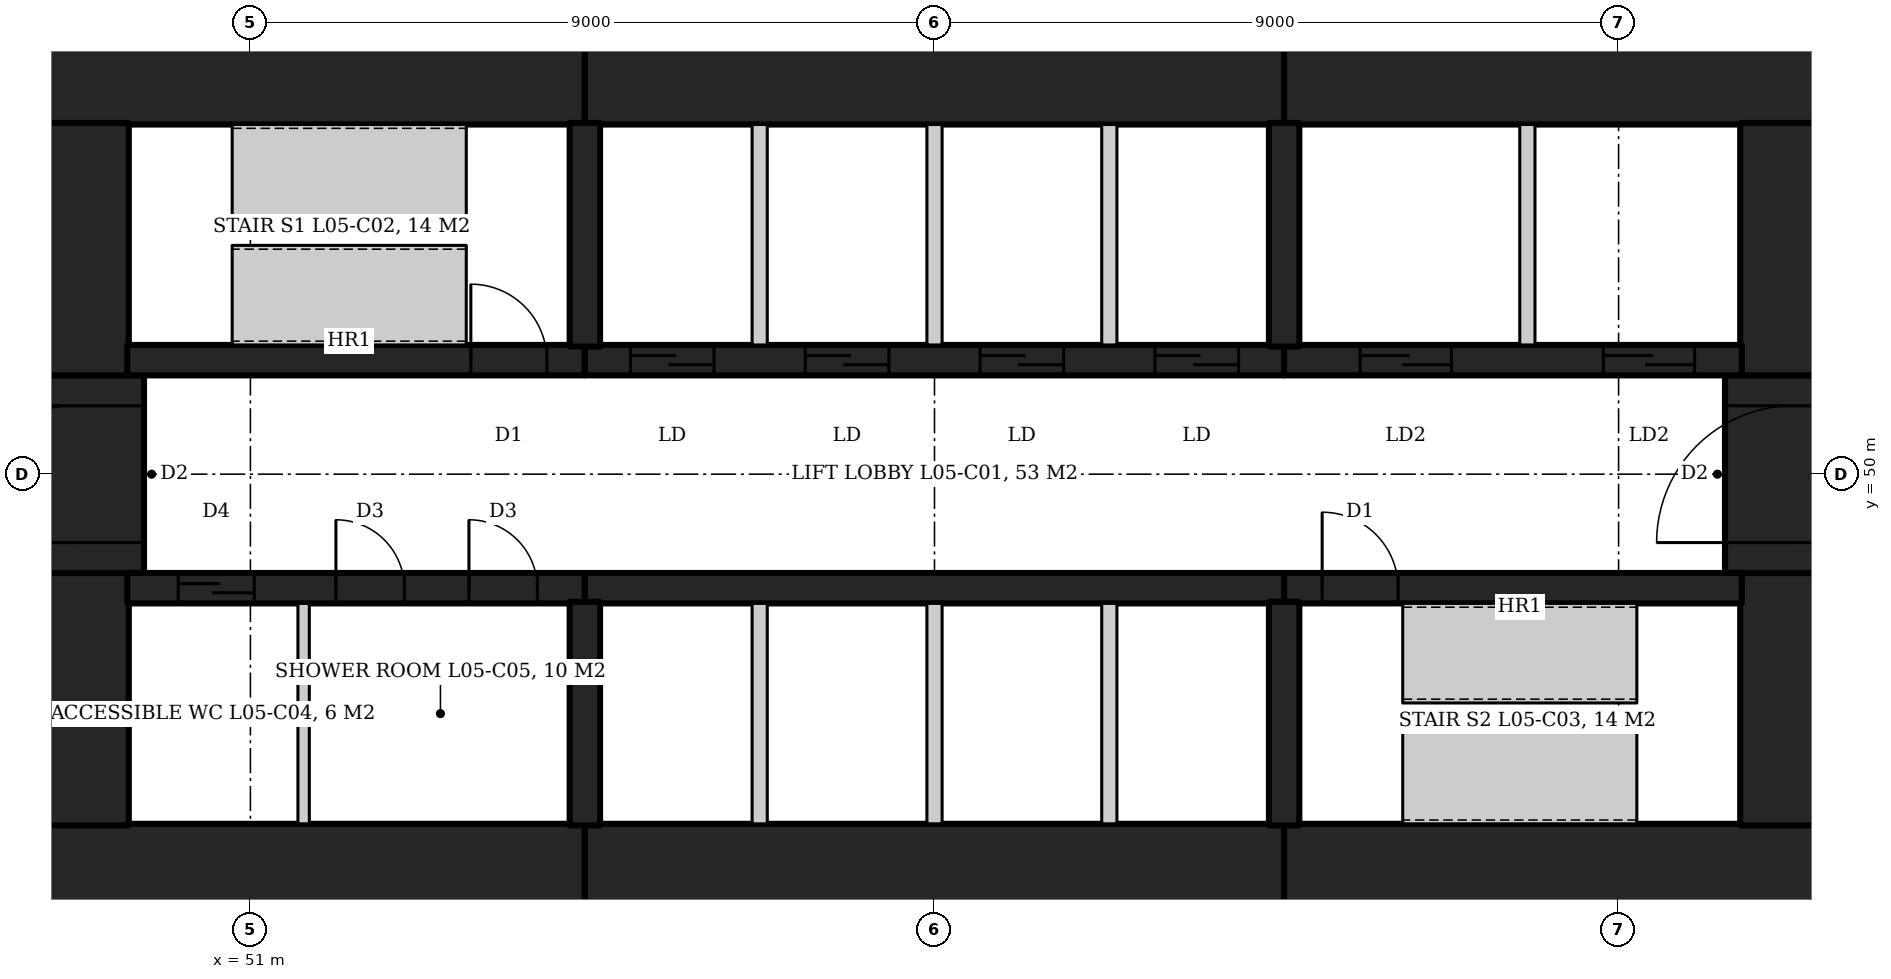
"""IFC4 building model, lengths in metres.
Left out: names, types, materials, properties, quantities, classifications, styles, units other than length and angle.
Written with IfcOpenShell. Run it as: python <this file> out.ifc"""

import sys

from ifc_helpers import new_model, si_unit, direction, frame, frame_2d, origin, place, context, subcontext, project, spatial, rectangle, extrude, element, fill, save


model = new_model("IFC4")
c1 = context("Model", 3, precision=1e-05, world=origin(), true_north=direction((0.0, 1.0)))
c2 = subcontext(c1, "Body", "Model", "MODEL_VIEW")
j1 = project(units=[si_unit("LENGTHUNIT", "METRE"), si_unit("PLANEANGLEUNIT", "RADIAN")], contexts=[c1])
p1 = place(None, origin())
s1 = spatial("IfcSite", under=j1, at=p1, CompositionType="ELEMENT")
p2 = place(p1, origin())
s2 = spatial("IfcBuilding", under=s1, at=p2, CompositionType="ELEMENT")
p3 = place(p2, frame((0.0, 0.0, 30.2)))
s3 = spatial("IfcBuildingStorey", under=s2, at=p3, CompositionType="ELEMENT", Elevation=30.2)
p4 = place(p3, frame((47.6, 55.5, 0.0), z_axis=(0.0, 0.0, 1.0), x_axis=(1.0, 0.0, 0.0)))
e1 = element("IfcWall", 1, at=p4, inside=s3, PredefinedType="SHEAR", context=c2, shape_type="SweptSolid", body=[
    extrude(rectangle(XDim=7.8, YDim=1.8, at=frame_2d((3.9, 0.0))), origin(), (0.0, 0.0, 1.0), 4.2),
])
p5 = place(p3, frame((55.4, 55.5, 0.0), z_axis=(0.0, 0.0, 1.0), x_axis=(1.0, 0.0, 0.0)))
e2 = element("IfcWall", 2, at=p5, inside=s3, PredefinedType="SHEAR", context=c2, shape_type="SweptSolid", body=[
    extrude(rectangle(XDim=9.2, YDim=1.8, at=frame_2d((4.6, 0.0))), origin(), (0.0, 0.0, 1.0), 4.2),
])
for number, where, z_axis, x_axis in (
    (3, (64.6, 55.5, 0.0), (0.0, 0.0, 1.0), (1.0, 0.0, 0.0)),
    (4, (47.6, 44.5, 0.0), (0.0, 0.0, 1.0), (1.0, 0.0, 0.0)),
):
    element("IfcWall", number, at=place(p3, frame(where, z_axis=z_axis, x_axis=x_axis)), inside=s3, PredefinedType="SHEAR", context=c2, shape_type="SweptSolid", body=[
        extrude(rectangle(XDim=7.8, YDim=1.8, at=frame_2d((3.9, 0.0))), origin(), (0.0, 0.0, 1.0), 4.2),
    ])
p6 = place(p3, frame((55.4, 44.5, 0.0), z_axis=(0.0, 0.0, 1.0), x_axis=(1.0, 0.0, 0.0)))
e5 = element("IfcWall", 5, at=p6, inside=s3, PredefinedType="SHEAR", context=c2, shape_type="SweptSolid", body=[
    extrude(rectangle(XDim=9.2, YDim=1.8, at=frame_2d((4.6, 0.0))), origin(), (0.0, 0.0, 1.0), 4.2),
])
p7 = place(p3, frame((64.6, 44.5, 0.0), z_axis=(0.0, 0.0, 1.0), x_axis=(1.0, 0.0, 0.0)))
e6 = element("IfcWall", 6, at=p7, inside=s3, PredefinedType="SHEAR", context=c2, shape_type="SweptSolid", body=[
    extrude(rectangle(XDim=7.8, YDim=1.8, at=frame_2d((3.9, 0.0))), origin(), (0.0, 0.0, 1.0), 4.2),
])
p8 = place(p3, frame((71.5, 45.38, 0.0), z_axis=(0.0, 0.0, 1.0), x_axis=(0.0, 1.0, 0.0)))
e7 = element("IfcWall", 7, at=p8, inside=s3, PredefinedType="SHEAR", context=c2, shape_type="SweptSolid", body=[
    extrude(rectangle(XDim=3.32, YDim=1.8, at=frame_2d((1.66, 0.0))), origin(), (0.0, 0.0, 1.0), 4.2),
])
p9 = place(p3, frame((71.3, 48.7, 0.0), z_axis=(0.0, 0.0, 1.0), x_axis=(0.0, 1.0, 0.0)))
e8 = element("IfcWall", 8, at=p9, inside=s3, PredefinedType="SHEAR", context=c2, shape_type="SweptSolid", body=[
    extrude(rectangle(XDim=2.6, YDim=1.8, at=frame_2d((1.3, 0.0))), origin(), (0.0, 0.0, 1.0), 4.2),
])
p10 = place(p9, frame((0.4, 0.0, 0.0)))
e9 = element("IfcOpeningElement", 9, at=p10, cuts=e8, PredefinedType="OPENING", context=c2, shape_type="SweptSolid", body=[
    extrude(rectangle(XDim=1.8, YDim=2.1, at=frame_2d((0.9, 1.05))), frame((0.0, 0.91, 0.0), z_axis=(0.0, -1.0, 0.0), x_axis=(1.0, 0.0, 0.0)), (0.0, 0.0, 1.0), 1.82),
])
for number, where, z_axis, x_axis in (
    (10, (71.5, 51.3, 0.0), (0.0, 0.0, 1.0), (0.0, 1.0, 0.0)),
    (11, (48.5, 45.38, 0.0), (0.0, 0.0, 1.0), (0.0, 1.0, 0.0)),
):
    element("IfcWall", number, at=place(p3, frame(where, z_axis=z_axis, x_axis=x_axis)), inside=s3, PredefinedType="SHEAR", context=c2, shape_type="SweptSolid", body=[
        extrude(rectangle(XDim=3.32, YDim=1.8, at=frame_2d((1.66, 0.0))), origin(), (0.0, 0.0, 1.0), 4.2),
    ])
p11 = place(p3, frame((48.7, 48.7, 0.0), z_axis=(0.0, 0.0, 1.0), x_axis=(0.0, 1.0, 0.0)))
e12 = element("IfcWall", 12, at=p11, inside=s3, PredefinedType="SHEAR", context=c2, shape_type="SweptSolid", body=[
    extrude(rectangle(XDim=2.6, YDim=1.8, at=frame_2d((1.3, 0.0))), origin(), (0.0, 0.0, 1.0), 4.2),
])
p12 = place(p11, frame((0.4, 0.0, 0.0)))
e13 = element("IfcOpeningElement", 13, at=p12, cuts=e12, PredefinedType="OPENING", context=c2, shape_type="SweptSolid", body=[
    extrude(rectangle(XDim=1.8, YDim=2.1, at=frame_2d((0.9, 1.05))), frame((0.0, 0.91, 0.0), z_axis=(0.0, -1.0, 0.0), x_axis=(1.0, 0.0, 0.0)), (0.0, 0.0, 1.0), 1.82),
])
p13 = place(p3, frame((48.5, 51.3, 0.0), z_axis=(0.0, 0.0, 1.0), x_axis=(0.0, 1.0, 0.0)))
e14 = element("IfcWall", 14, at=p13, inside=s3, PredefinedType="SHEAR", context=c2, shape_type="SweptSolid", body=[
    extrude(rectangle(XDim=3.32, YDim=1.8, at=frame_2d((1.66, 0.0))), origin(), (0.0, 0.0, 1.0), 4.2),
])
p14 = place(p3, frame((49.38, 51.5, 0.0), z_axis=(0.0, 0.0, 1.0), x_axis=(1.0, 0.0, 0.0)))
e15 = element("IfcWall", 15, at=p14, inside=s3, PredefinedType="SHEAR", context=c2, shape_type="SweptSolid", body=[
    extrude(rectangle(XDim=6.02, YDim=0.4, at=frame_2d((3.01, 0.0))), origin(), (0.0, 0.0, 1.0), 4.2),
])
p15 = place(p14, frame((4.52, 0.0, 0.0)))
e16 = element("IfcOpeningElement", 16, at=p15, cuts=e15, PredefinedType="OPENING", context=c2, shape_type="SweptSolid", body=[
    extrude(rectangle(XDim=1.0, YDim=2.1, at=frame_2d((0.5, 1.05))), frame((0.0, 0.21, 0.0), z_axis=(0.0, -1.0, 0.0), x_axis=(1.0, 0.0, 0.0)), (0.0, 0.0, 1.0), 0.42),
])
p16 = place(p3, frame((55.4, 51.5, 0.0), z_axis=(0.0, 0.0, 1.0), x_axis=(1.0, 0.0, 0.0)))
e17 = element("IfcWall", 17, at=p16, inside=s3, PredefinedType="SHEAR", context=c2, shape_type="SweptSolid", body=[
    extrude(rectangle(XDim=9.2, YDim=0.4, at=frame_2d((4.6, 0.0))), origin(), (0.0, 0.0, 1.0), 4.2),
])
p17 = place(p16, frame((0.6, 0.0, 0.0)))
e18 = element("IfcOpeningElement", 18, at=p17, cuts=e17, PredefinedType="OPENING", context=c2, shape_type="SweptSolid", body=[
    extrude(rectangle(XDim=1.1, YDim=2.1, at=frame_2d((0.55, 1.05))), frame((0.0, 0.21, 0.0), z_axis=(0.0, -1.0, 0.0), x_axis=(1.0, 0.0, 0.0)), (0.0, 0.0, 1.0), 0.42),
])
p18 = place(p16, frame((2.9, 0.0, 0.0)))
e19 = element("IfcOpeningElement", 19, at=p18, cuts=e17, PredefinedType="OPENING", context=c2, shape_type="SweptSolid", body=[
    extrude(rectangle(XDim=1.1, YDim=2.1, at=frame_2d((0.55, 1.05))), frame((0.0, 0.21, 0.0), z_axis=(0.0, -1.0, 0.0), x_axis=(1.0, 0.0, 0.0)), (0.0, 0.0, 1.0), 0.42),
])
p19 = place(p16, frame((5.2, 0.0, 0.0)))
e20 = element("IfcOpeningElement", 20, at=p19, cuts=e17, PredefinedType="OPENING", context=c2, shape_type="SweptSolid", body=[
    extrude(rectangle(XDim=1.1, YDim=2.1, at=frame_2d((0.55, 1.05))), frame((0.0, 0.21, 0.0), z_axis=(0.0, -1.0, 0.0), x_axis=(1.0, 0.0, 0.0)), (0.0, 0.0, 1.0), 0.42),
])
p20 = place(p16, frame((7.5, 0.0, 0.0)))
e21 = element("IfcOpeningElement", 21, at=p20, cuts=e17, PredefinedType="OPENING", context=c2, shape_type="SweptSolid", body=[
    extrude(rectangle(XDim=1.1, YDim=2.1, at=frame_2d((0.55, 1.05))), frame((0.0, 0.21, 0.0), z_axis=(0.0, -1.0, 0.0), x_axis=(1.0, 0.0, 0.0)), (0.0, 0.0, 1.0), 0.42),
])
p21 = place(p3, frame((64.6, 51.5, 0.0), z_axis=(0.0, 0.0, 1.0), x_axis=(1.0, 0.0, 0.0)))
e22 = element("IfcWall", 22, at=p21, inside=s3, PredefinedType="SHEAR", context=c2, shape_type="SweptSolid", body=[
    extrude(rectangle(XDim=6.02, YDim=0.4, at=frame_2d((3.01, 0.0))), origin(), (0.0, 0.0, 1.0), 4.2),
])
p22 = place(p21, frame((1.0, 0.0, 0.0)))
e23 = element("IfcOpeningElement", 23, at=p22, cuts=e22, PredefinedType="OPENING", context=c2, shape_type="SweptSolid", body=[
    extrude(rectangle(XDim=1.2, YDim=2.1, at=frame_2d((0.6, 1.05))), frame((0.0, 0.21, 0.0), z_axis=(0.0, -1.0, 0.0), x_axis=(1.0, 0.0, 0.0)), (0.0, 0.0, 1.0), 0.42),
])
p23 = place(p21, frame((4.2, 0.0, 0.0)))
e24 = element("IfcOpeningElement", 24, at=p23, cuts=e22, PredefinedType="OPENING", context=c2, shape_type="SweptSolid", body=[
    extrude(rectangle(XDim=1.2, YDim=2.1, at=frame_2d((0.6, 1.05))), frame((0.0, 0.21, 0.0), z_axis=(0.0, -1.0, 0.0), x_axis=(1.0, 0.0, 0.0)), (0.0, 0.0, 1.0), 0.42),
])
p24 = place(p3, frame((49.38, 48.5, 0.0), z_axis=(0.0, 0.0, 1.0), x_axis=(1.0, 0.0, 0.0)))
e25 = element("IfcWall", 25, at=p24, inside=s3, PredefinedType="SHEAR", context=c2, shape_type="SweptSolid", body=[
    extrude(rectangle(XDim=6.02, YDim=0.4, at=frame_2d((3.01, 0.0))), origin(), (0.0, 0.0, 1.0), 4.2),
])
p25 = place(p24, frame((0.67, 0.0, 0.0)))
e26 = element("IfcOpeningElement", 26, at=p25, cuts=e25, PredefinedType="OPENING", context=c2, shape_type="SweptSolid", body=[
    extrude(rectangle(XDim=1.0, YDim=2.1, at=frame_2d((0.5, 1.05))), frame((0.0, 0.21, 0.0), z_axis=(0.0, -1.0, 0.0), x_axis=(1.0, 0.0, 0.0)), (0.0, 0.0, 1.0), 0.42),
])
p26 = place(p24, frame((2.745, 0.0, 0.0)))
e27 = element("IfcOpeningElement", 27, at=p26, cuts=e25, PredefinedType="OPENING", context=c2, shape_type="SweptSolid", body=[
    extrude(rectangle(XDim=0.9, YDim=2.1, at=frame_2d((0.45, 1.05))), frame((0.0, 0.21, 0.0), z_axis=(0.0, -1.0, 0.0), x_axis=(1.0, 0.0, 0.0)), (0.0, 0.0, 1.0), 0.42),
])
p27 = place(p24, frame((4.495, 0.0, 0.0)))
e28 = element("IfcOpeningElement", 28, at=p27, cuts=e25, PredefinedType="OPENING", context=c2, shape_type="SweptSolid", body=[
    extrude(rectangle(XDim=0.9, YDim=2.1, at=frame_2d((0.45, 1.05))), frame((0.0, 0.21, 0.0), z_axis=(0.0, -1.0, 0.0), x_axis=(1.0, 0.0, 0.0)), (0.0, 0.0, 1.0), 0.42),
])
p28 = place(p3, frame((55.4, 48.5, 0.0), z_axis=(0.0, 0.0, 1.0), x_axis=(1.0, 0.0, 0.0)))
e29 = element("IfcWall", 29, at=p28, inside=s3, PredefinedType="SHEAR", context=c2, shape_type="SweptSolid", body=[
    extrude(rectangle(XDim=9.2, YDim=0.4, at=frame_2d((4.6, 0.0))), origin(), (0.0, 0.0, 1.0), 4.2),
])
p29 = place(p3, frame((64.6, 48.5, 0.0), z_axis=(0.0, 0.0, 1.0), x_axis=(1.0, 0.0, 0.0)))
e30 = element("IfcWall", 30, at=p29, inside=s3, PredefinedType="SHEAR", context=c2, shape_type="SweptSolid", body=[
    extrude(rectangle(XDim=6.02, YDim=0.4, at=frame_2d((3.01, 0.0))), origin(), (0.0, 0.0, 1.0), 4.2),
])
p30 = place(p29, frame((0.5, 0.0, 0.0)))
e31 = element("IfcOpeningElement", 31, at=p30, cuts=e30, PredefinedType="OPENING", context=c2, shape_type="SweptSolid", body=[
    extrude(rectangle(XDim=1.0, YDim=2.1, at=frame_2d((0.5, 1.05))), frame((0.0, 0.21, 0.0), z_axis=(0.0, -1.0, 0.0), x_axis=(1.0, 0.0, 0.0)), (0.0, 0.0, 1.0), 0.42),
])
for number, where, z_axis, x_axis in (
    (32, (55.4, 51.68, 0.0), (0.0, 0.0, 1.0), (0.0, 1.0, 0.0)),
    (33, (64.6, 51.68, 0.0), (0.0, 0.0, 1.0), (0.0, 1.0, 0.0)),
    (34, (55.4, 48.32, 0.0), (0.0, 0.0, 1.0), (0.0, -1.0, 0.0)),
    (35, (64.6, 48.32, 0.0), (0.0, 0.0, 1.0), (0.0, -1.0, 0.0)),
):
    element("IfcWall", number, at=place(p3, frame(where, z_axis=z_axis, x_axis=x_axis)), inside=s3, PredefinedType="SHEAR", context=c2, shape_type="SweptSolid", body=[
        extrude(rectangle(XDim=2.94, YDim=0.4, at=frame_2d((1.47, 0.0))), origin(), (0.0, 0.0, 1.0), 4.2),
    ])
for number, where, z_axis, x_axis in (
    (36, (57.7, 51.7, 0.0), (0.0, 0.0, 1.0), (0.0, 1.0, 0.0)),
    (37, (60.0, 51.7, 0.0), (0.0, 0.0, 1.0), (0.0, 1.0, 0.0)),
    (38, (62.3, 51.7, 0.0), (0.0, 0.0, 1.0), (0.0, 1.0, 0.0)),
    (39, (57.7, 45.4, 0.0), (0.0, 0.0, 1.0), (0.0, 1.0, 0.0)),
    (40, (60.0, 45.4, 0.0), (0.0, 0.0, 1.0), (0.0, 1.0, 0.0)),
    (41, (62.3, 45.4, 0.0), (0.0, 0.0, 1.0), (0.0, 1.0, 0.0)),
    (42, (67.8, 51.7, 0.0), (0.0, 0.0, 1.0), (0.0, 1.0, 0.0)),
):
    element("IfcWall", number, at=place(p3, frame(where, z_axis=z_axis, x_axis=x_axis)), inside=s3, PredefinedType="PARTITIONING", context=c2, shape_type="SweptSolid", body=[
        extrude(rectangle(XDim=2.9, YDim=0.2, at=frame_2d((1.45, 0.0))), origin(), (0.0, 0.0, 1.0), 4.2),
    ])
p31 = place(p3, frame((51.7, 45.4, 0.0), z_axis=(0.0, 0.0, 1.0), x_axis=(0.0, 1.0, 0.0)))
e43 = element("IfcWall", 43, at=p31, inside=s3, PredefinedType="PARTITIONING", context=c2, shape_type="SweptSolid", body=[
    extrude(rectangle(XDim=2.9, YDim=0.15, at=frame_2d((1.45, 0.0))), origin(), (0.0, 0.0, 1.0), 4.04),
])
p32 = place(p15, origin())
e44 = element("IfcDoor", 44, at=p32, inside=s3, OperationType="SINGLE_SWING_LEFT", PredefinedType="DOOR", context=c2, shape_type="SweptSolid", body=[
    extrude(rectangle(XDim=1.0, YDim=2.1, at=frame_2d((0.5, 1.05))), frame((0.0, 0.025, 0.0), z_axis=(0.0, -1.0, 0.0), x_axis=(1.0, 0.0, 0.0)), (0.0, 0.0, 1.0), 0.05),
])
fill(e16, e44)
p33 = place(p30, origin())
e45 = element("IfcDoor", 45, at=p33, inside=s3, OperationType="SINGLE_SWING_LEFT", PredefinedType="DOOR", context=c2, shape_type="SweptSolid", body=[
    extrude(rectangle(XDim=1.0, YDim=2.1, at=frame_2d((0.5, 1.05))), frame((0.0, 0.025, 0.0), z_axis=(0.0, -1.0, 0.0), x_axis=(1.0, 0.0, 0.0)), (0.0, 0.0, 1.0), 0.05),
])
fill(e31, e45)
p34 = place(p22, origin())
e46 = element("IfcDoor", 46, at=p34, inside=s3, OperationType="SLIDING_TO_LEFT", PredefinedType="DOOR", context=c2, shape_type="SweptSolid", body=[
    extrude(rectangle(XDim=1.2, YDim=2.1, at=frame_2d((0.6, 1.05))), frame((0.0, 0.025, 0.0), z_axis=(0.0, -1.0, 0.0), x_axis=(1.0, 0.0, 0.0)), (0.0, 0.0, 1.0), 0.05),
])
fill(e23, e46)
p35 = place(p23, origin())
e47 = element("IfcDoor", 47, at=p35, inside=s3, OperationType="SLIDING_TO_LEFT", PredefinedType="DOOR", context=c2, shape_type="SweptSolid", body=[
    extrude(rectangle(XDim=1.2, YDim=2.1, at=frame_2d((0.6, 1.05))), frame((0.0, 0.025, 0.0), z_axis=(0.0, -1.0, 0.0), x_axis=(1.0, 0.0, 0.0)), (0.0, 0.0, 1.0), 0.05),
])
fill(e24, e47)
p36 = place(p17, origin())
e48 = element("IfcDoor", 48, at=p36, inside=s3, OperationType="SLIDING_TO_LEFT", PredefinedType="DOOR", context=c2, shape_type="SweptSolid", body=[
    extrude(rectangle(XDim=1.1, YDim=2.1, at=frame_2d((0.55, 1.05))), frame((0.0, 0.025, 0.0), z_axis=(0.0, -1.0, 0.0), x_axis=(1.0, 0.0, 0.0)), (0.0, 0.0, 1.0), 0.05),
])
fill(e18, e48)
p37 = place(p18, origin())
e49 = element("IfcDoor", 49, at=p37, inside=s3, OperationType="SLIDING_TO_LEFT", PredefinedType="DOOR", context=c2, shape_type="SweptSolid", body=[
    extrude(rectangle(XDim=1.1, YDim=2.1, at=frame_2d((0.55, 1.05))), frame((0.0, 0.025, 0.0), z_axis=(0.0, -1.0, 0.0), x_axis=(1.0, 0.0, 0.0)), (0.0, 0.0, 1.0), 0.05),
])
fill(e19, e49)
p38 = place(p19, origin())
e50 = element("IfcDoor", 50, at=p38, inside=s3, OperationType="SLIDING_TO_LEFT", PredefinedType="DOOR", context=c2, shape_type="SweptSolid", body=[
    extrude(rectangle(XDim=1.1, YDim=2.1, at=frame_2d((0.55, 1.05))), frame((0.0, 0.025, 0.0), z_axis=(0.0, -1.0, 0.0), x_axis=(1.0, 0.0, 0.0)), (0.0, 0.0, 1.0), 0.05),
])
fill(e20, e50)
p39 = place(p20, origin())
e51 = element("IfcDoor", 51, at=p39, inside=s3, OperationType="SLIDING_TO_LEFT", PredefinedType="DOOR", context=c2, shape_type="SweptSolid", body=[
    extrude(rectangle(XDim=1.1, YDim=2.1, at=frame_2d((0.55, 1.05))), frame((0.0, 0.025, 0.0), z_axis=(0.0, -1.0, 0.0), x_axis=(1.0, 0.0, 0.0)), (0.0, 0.0, 1.0), 0.05),
])
fill(e21, e51)
p40 = place(p25, origin())
e52 = element("IfcDoor", 52, at=p40, inside=s3, OperationType="SLIDING_TO_LEFT", PredefinedType="DOOR", context=c2, shape_type="SweptSolid", body=[
    extrude(rectangle(XDim=1.0, YDim=2.1, at=frame_2d((0.5, 1.05))), frame((0.0, 0.025, 0.0), z_axis=(0.0, -1.0, 0.0), x_axis=(1.0, 0.0, 0.0)), (0.0, 0.0, 1.0), 0.05),
])
fill(e26, e52)
p41 = place(p26, origin())
e53 = element("IfcDoor", 53, at=p41, inside=s3, OperationType="SINGLE_SWING_RIGHT", PredefinedType="DOOR", context=c2, shape_type="SweptSolid", body=[
    extrude(rectangle(XDim=0.9, YDim=2.1, at=frame_2d((0.45, 1.05))), frame((0.0, 0.025, 0.0), z_axis=(0.0, -1.0, 0.0), x_axis=(1.0, 0.0, 0.0)), (0.0, 0.0, 1.0), 0.05),
])
fill(e27, e53)
p42 = place(p27, origin())
e54 = element("IfcDoor", 54, at=p42, inside=s3, OperationType="SINGLE_SWING_RIGHT", PredefinedType="DOOR", context=c2, shape_type="SweptSolid", body=[
    extrude(rectangle(XDim=0.9, YDim=2.1, at=frame_2d((0.45, 1.05))), frame((0.0, 0.025, 0.0), z_axis=(0.0, -1.0, 0.0), x_axis=(1.0, 0.0, 0.0)), (0.0, 0.0, 1.0), 0.05),
])
fill(e28, e54)
p43 = place(p10, origin())
e55 = element("IfcDoor", 55, at=p43, inside=s3, OperationType="DOUBLE_DOOR_DOUBLE_SWING", PredefinedType="DOOR", context=c2, shape_type="SweptSolid", body=[
    extrude(rectangle(XDim=1.8, YDim=2.1, at=frame_2d((0.9, 1.05))), frame((0.0, 0.025, 0.0), z_axis=(0.0, -1.0, 0.0), x_axis=(1.0, 0.0, 0.0)), (0.0, 0.0, 1.0), 0.05),
])
fill(e9, e55)
p44 = place(p12, origin())
e56 = element("IfcDoor", 56, at=p44, inside=s3, OperationType="DOUBLE_DOOR_DOUBLE_SWING", PredefinedType="DOOR", context=c2, shape_type="SweptSolid", body=[
    extrude(rectangle(XDim=1.8, YDim=2.1, at=frame_2d((0.9, 1.05))), frame((0.0, 0.025, 0.0), z_axis=(0.0, -1.0, 0.0), x_axis=(1.0, 0.0, 0.0)), (0.0, 0.0, 1.0), 0.05),
])
fill(e13, e56)
save(model, sys.argv[1])
